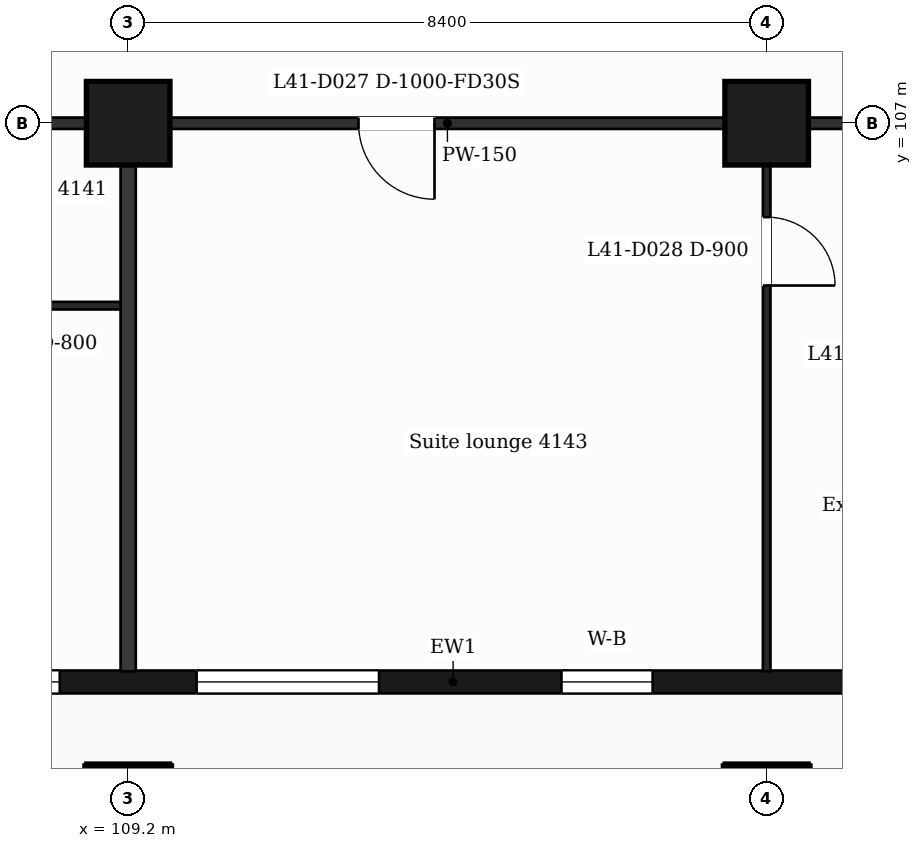
"""IFC4 building model, lengths in metres.
Left out: names, types, materials, properties, quantities, classifications, styles, units other than length and angle.
Written with IfcOpenShell. Run it as: python <this file> out.ifc"""

import sys

from ifc_helpers import new_model, si_unit, direction, frame, frame_2d, origin, origin_2d, place, context, subcontext, project, spatial, rectangle, extrude, element, fill, save


model = new_model("IFC4")
c1 = context("Model", 3, precision=1e-05, world=origin(), true_north=direction((0.0, 1.0)))
c2 = subcontext(c1, "Body", "Model", "MODEL_VIEW")
j1 = project(units=[si_unit("LENGTHUNIT", "METRE"), si_unit("PLANEANGLEUNIT", "RADIAN")], contexts=[c1])
p1 = place(None, origin())
s1 = spatial("IfcSite", under=j1, at=p1, CompositionType="ELEMENT")
p2 = place(p1, origin())
s2 = spatial("IfcBuilding", under=s1, at=p2, CompositionType="ELEMENT")
p3 = place(p2, frame((0.0, 0.0, 173.7)))
s3 = spatial("IfcBuildingStorey", under=s2, at=p3, CompositionType="ELEMENT", Elevation=173.7)
for number, where, z_axis, x_axis in (
    (1, (109.2, 98.0, 0.0), (0.0, 0.0, 1.0), (1.0, 0.0, 0.0)),
    (2, (117.6, 98.0, 0.0), (0.0, 0.0, 1.0), (1.0, 0.0, 0.0)),
    (3, (109.2, 107.0, 0.0), (0.0, 0.0, 1.0), (1.0, 0.0, 0.0)),
    (4, (117.6, 107.0, 0.0), (0.0, 0.0, 1.0), (1.0, 0.0, 0.0)),
):
    element("IfcColumn", number, at=place(p3, frame(where, z_axis=z_axis, x_axis=x_axis)), inside=s3, PredefinedType="COLUMN", context=c2, shape_type="SweptSolid", body=[
        extrude(rectangle(XDim=1.1, YDim=1.1, at=origin_2d()), origin(), (0.0, 0.0, 1.0), 3.7),
    ])
p4 = place(p3, frame((89.85, 99.65, 0.0), z_axis=(0.0, 0.0, 1.0), x_axis=(1.0, 0.0, 0.0)))
e5 = element("IfcWall", 5, at=p4, inside=s3, PredefinedType="SOLIDWALL", context=c2, shape_type="SweptSolid", body=[
    extrude(rectangle(XDim=47.25, YDim=0.3, at=frame_2d((23.625, 0.0))), origin(), (0.0, 0.0, 1.0), 3.38),
])
p5 = place(p4, frame((0.725, 0.0, 0.9)))
e6 = element("IfcOpeningElement", 6, at=p5, cuts=e5, PredefinedType="OPENING", context=c2, shape_type="SweptSolid", body=[
    extrude(rectangle(XDim=1.2, YDim=2.1, at=frame_2d((0.6, 1.05))), frame((0.0, 0.16, 0.0), z_axis=(0.0, -1.0, 0.0), x_axis=(1.0, 0.0, 0.0)), (0.0, 0.0, 1.0), 0.32),
])
p6 = place(p4, frame((3.45, 0.0, 0.9)))
e7 = element("IfcOpeningElement", 7, at=p6, cuts=e5, PredefinedType="OPENING", context=c2, shape_type="SweptSolid", body=[
    extrude(rectangle(XDim=2.4, YDim=2.1, at=frame_2d((1.2, 1.05))), frame((0.0, 0.16, 0.0), z_axis=(0.0, -1.0, 0.0), x_axis=(1.0, 0.0, 0.0)), (0.0, 0.0, 1.0), 0.32),
])
p7 = place(p4, frame((7.65, 0.0, 0.9)))
e8 = element("IfcOpeningElement", 8, at=p7, cuts=e5, PredefinedType="OPENING", context=c2, shape_type="SweptSolid", body=[
    extrude(rectangle(XDim=2.4, YDim=2.1, at=frame_2d((1.2, 1.05))), frame((0.0, 0.16, 0.0), z_axis=(0.0, -1.0, 0.0), x_axis=(1.0, 0.0, 0.0)), (0.0, 0.0, 1.0), 0.32),
])
p8 = place(p4, frame((11.85, 0.0, 0.9)))
e9 = element("IfcOpeningElement", 9, at=p8, cuts=e5, PredefinedType="OPENING", context=c2, shape_type="SweptSolid", body=[
    extrude(rectangle(XDim=2.4, YDim=2.1, at=frame_2d((1.2, 1.05))), frame((0.0, 0.16, 0.0), z_axis=(0.0, -1.0, 0.0), x_axis=(1.0, 0.0, 0.0)), (0.0, 0.0, 1.0), 0.32),
])
p9 = place(p4, frame((16.05, 0.0, 0.9)))
e10 = element("IfcOpeningElement", 10, at=p9, cuts=e5, PredefinedType="OPENING", context=c2, shape_type="SweptSolid", body=[
    extrude(rectangle(XDim=2.4, YDim=2.1, at=frame_2d((1.2, 1.05))), frame((0.0, 0.16, 0.0), z_axis=(0.0, -1.0, 0.0), x_axis=(1.0, 0.0, 0.0)), (0.0, 0.0, 1.0), 0.32),
])
p10 = place(p4, frame((20.25, 0.0, 0.9)))
e11 = element("IfcOpeningElement", 11, at=p10, cuts=e5, PredefinedType="OPENING", context=c2, shape_type="SweptSolid", body=[
    extrude(rectangle(XDim=2.4, YDim=2.1, at=frame_2d((1.2, 1.05))), frame((0.0, 0.16, 0.0), z_axis=(0.0, -1.0, 0.0), x_axis=(1.0, 0.0, 0.0)), (0.0, 0.0, 1.0), 0.32),
])
p11 = place(p4, frame((25.05, 0.0, 0.9)))
e12 = element("IfcOpeningElement", 12, at=p11, cuts=e5, PredefinedType="OPENING", context=c2, shape_type="SweptSolid", body=[
    extrude(rectangle(XDim=1.2, YDim=2.1, at=frame_2d((0.6, 1.05))), frame((0.0, 0.16, 0.0), z_axis=(0.0, -1.0, 0.0), x_axis=(1.0, 0.0, 0.0)), (0.0, 0.0, 1.0), 0.32),
])
p12 = place(p4, frame((29.25, 0.0, 0.9)))
e13 = element("IfcOpeningElement", 13, at=p12, cuts=e5, PredefinedType="OPENING", context=c2, shape_type="SweptSolid", body=[
    extrude(rectangle(XDim=1.2, YDim=2.1, at=frame_2d((0.6, 1.05))), frame((0.0, 0.16, 0.0), z_axis=(0.0, -1.0, 0.0), x_axis=(1.0, 0.0, 0.0)), (0.0, 0.0, 1.0), 0.32),
])
p13 = place(p4, frame((32.55, 0.0, 0.0)))
e14 = element("IfcOpeningElement", 14, at=p13, cuts=e5, PredefinedType="OPENING", context=c2, shape_type="SweptSolid", body=[
    extrude(rectangle(XDim=1.2, YDim=2.4, at=frame_2d((0.6, 1.2))), frame((0.0, 0.16, 0.0), z_axis=(0.0, -1.0, 0.0), x_axis=(1.0, 0.0, 0.0)), (0.0, 0.0, 1.0), 0.32),
])
p14 = place(p4, frame((34.35, 0.0, 0.9)))
e15 = element("IfcOpeningElement", 15, at=p14, cuts=e5, PredefinedType="OPENING", context=c2, shape_type="SweptSolid", body=[
    extrude(rectangle(XDim=1.2, YDim=2.1, at=frame_2d((0.6, 1.05))), frame((0.0, 0.16, 0.0), z_axis=(0.0, -1.0, 0.0), x_axis=(1.0, 0.0, 0.0)), (0.0, 0.0, 1.0), 0.32),
])
p15 = place(p4, frame((37.05, 0.0, 0.9)))
e16 = element("IfcOpeningElement", 16, at=p15, cuts=e5, PredefinedType="OPENING", context=c2, shape_type="SweptSolid", body=[
    extrude(rectangle(XDim=2.4, YDim=2.1, at=frame_2d((1.2, 1.05))), frame((0.0, 0.16, 0.0), z_axis=(0.0, -1.0, 0.0), x_axis=(1.0, 0.0, 0.0)), (0.0, 0.0, 1.0), 0.32),
])
p16 = place(p4, frame((40.95, 0.0, 0.0)))
e17 = element("IfcOpeningElement", 17, at=p16, cuts=e5, PredefinedType="OPENING", context=c2, shape_type="SweptSolid", body=[
    extrude(rectangle(XDim=1.2, YDim=2.4, at=frame_2d((0.6, 1.2))), frame((0.0, 0.16, 0.0), z_axis=(0.0, -1.0, 0.0), x_axis=(1.0, 0.0, 0.0)), (0.0, 0.0, 1.0), 0.32),
])
p17 = place(p4, frame((42.75, 0.0, 0.9)))
e18 = element("IfcOpeningElement", 18, at=p17, cuts=e5, PredefinedType="OPENING", context=c2, shape_type="SweptSolid", body=[
    extrude(rectangle(XDim=1.2, YDim=2.1, at=frame_2d((0.6, 1.05))), frame((0.0, 0.16, 0.0), z_axis=(0.0, -1.0, 0.0), x_axis=(1.0, 0.0, 0.0)), (0.0, 0.0, 1.0), 0.32),
])
p18 = place(p4, frame((45.25, 0.0, 0.9)))
e19 = element("IfcOpeningElement", 19, at=p18, cuts=e5, PredefinedType="OPENING", context=c2, shape_type="SweptSolid", body=[
    extrude(rectangle(XDim=1.2, YDim=2.1, at=frame_2d((0.6, 1.05))), frame((0.0, 0.16, 0.0), z_axis=(0.0, -1.0, 0.0), x_axis=(1.0, 0.0, 0.0)), (0.0, 0.0, 1.0), 0.32),
])
p19 = place(p3, frame((106.45, 104.6, 0.0), z_axis=(0.0, 0.0, 1.0), x_axis=(1.0, 0.0, 0.0)))
e20 = element("IfcWall", 20, at=p19, inside=s3, PredefinedType="PARTITIONING", context=c2, shape_type="SweptSolid", body=[
    extrude(rectangle(XDim=2.75, YDim=0.1, at=frame_2d((1.375, 0.0))), origin(), (0.0, 0.0, 1.0), 3.38),
])
p20 = place(p19, frame((0.88, 0.0, 0.0)))
e21 = element("IfcOpeningElement", 21, at=p20, cuts=e20, PredefinedType="OPENING", context=c2, shape_type="SweptSolid", body=[
    extrude(rectangle(XDim=0.8, YDim=2.1, at=frame_2d((0.4, 1.05))), frame((0.0, 0.06, 0.0), z_axis=(0.0, -1.0, 0.0), x_axis=(1.0, 0.0, 0.0)), (0.0, 0.0, 1.0), 0.12),
])
p21 = place(p3, frame((87.018, 107.0, 0.0), z_axis=(0.0, 0.0, 1.0), x_axis=(1.0, 0.0, 0.0)))
e22 = element("IfcWall", 22, at=p21, inside=s3, PredefinedType="PARTITIONING", context=c2, shape_type="SweptSolid", body=[
    extrude(rectangle(XDim=52.765, YDim=0.15, at=frame_2d((26.382, 0.0))), origin(), (0.0, 0.0, 1.0), 3.38),
])
p22 = place(p21, frame((1.276, 0.0, 0.0)))
e23 = element("IfcOpeningElement", 23, at=p22, cuts=e22, PredefinedType="OPENING", context=c2, shape_type="SweptSolid", body=[
    extrude(rectangle(XDim=0.95, YDim=2.1, at=frame_2d((0.475, 1.05))), frame((0.0, 0.085, 0.0), z_axis=(0.0, -1.0, 0.0), x_axis=(1.0, 0.0, 0.0)), (0.0, 0.0, 1.0), 0.17),
])
p23 = place(p21, frame((8.357, 0.0, 0.0)))
e24 = element("IfcOpeningElement", 24, at=p23, cuts=e22, PredefinedType="OPENING", context=c2, shape_type="SweptSolid", body=[
    extrude(rectangle(XDim=0.95, YDim=2.1, at=frame_2d((0.475, 1.05))), frame((0.0, 0.085, 0.0), z_axis=(0.0, -1.0, 0.0), x_axis=(1.0, 0.0, 0.0)), (0.0, 0.0, 1.0), 0.17),
])
p24 = place(p21, frame((9.832, 0.0, 0.0)))
e25 = element("IfcOpeningElement", 25, at=p24, cuts=e22, PredefinedType="OPENING", context=c2, shape_type="SweptSolid", body=[
    extrude(rectangle(XDim=1.0, YDim=2.1, at=frame_2d((0.5, 1.05))), frame((0.0, 0.085, 0.0), z_axis=(0.0, -1.0, 0.0), x_axis=(1.0, 0.0, 0.0)), (0.0, 0.0, 1.0), 0.17),
])
p25 = place(p21, frame((14.547, 0.0, 0.0)))
e26 = element("IfcOpeningElement", 26, at=p25, cuts=e22, PredefinedType="OPENING", context=c2, shape_type="SweptSolid", body=[
    extrude(rectangle(XDim=0.95, YDim=2.1, at=frame_2d((0.475, 1.05))), frame((0.0, 0.085, 0.0), z_axis=(0.0, -1.0, 0.0), x_axis=(1.0, 0.0, 0.0)), (0.0, 0.0, 1.0), 0.17),
])
p26 = place(p21, frame((18.257, 0.0, 0.0)))
e27 = element("IfcOpeningElement", 27, at=p26, cuts=e22, PredefinedType="OPENING", context=c2, shape_type="SweptSolid", body=[
    extrude(rectangle(XDim=0.95, YDim=2.1, at=frame_2d((0.475, 1.05))), frame((0.0, 0.085, 0.0), z_axis=(0.0, -1.0, 0.0), x_axis=(1.0, 0.0, 0.0)), (0.0, 0.0, 1.0), 0.17),
])
p27 = place(p21, frame((25.212, 0.0, 0.0)))
e28 = element("IfcOpeningElement", 28, at=p27, cuts=e22, PredefinedType="OPENING", context=c2, shape_type="SweptSolid", body=[
    extrude(rectangle(XDim=1.0, YDim=2.1, at=frame_2d((0.5, 1.05))), frame((0.0, 0.085, 0.0), z_axis=(0.0, -1.0, 0.0), x_axis=(1.0, 0.0, 0.0)), (0.0, 0.0, 1.0), 0.17),
])
p28 = place(p21, frame((37.267, 0.0, 0.0)))
e29 = element("IfcOpeningElement", 29, at=p28, cuts=e22, PredefinedType="OPENING", context=c2, shape_type="SweptSolid", body=[
    extrude(rectangle(XDim=0.95, YDim=2.1, at=frame_2d((0.475, 1.05))), frame((0.0, 0.085, 0.0), z_axis=(0.0, -1.0, 0.0), x_axis=(1.0, 0.0, 0.0)), (0.0, 0.0, 1.0), 0.17),
])
p29 = place(p21, frame((41.957, 0.0, 0.0)))
e30 = element("IfcOpeningElement", 30, at=p29, cuts=e22, PredefinedType="OPENING", context=c2, shape_type="SweptSolid", body=[
    extrude(rectangle(XDim=0.95, YDim=2.1, at=frame_2d((0.475, 1.05))), frame((0.0, 0.085, 0.0), z_axis=(0.0, -1.0, 0.0), x_axis=(1.0, 0.0, 0.0)), (0.0, 0.0, 1.0), 0.17),
])
p30 = place(p21, frame((45.632, 0.0, 0.0)))
e31 = element("IfcOpeningElement", 31, at=p30, cuts=e22, PredefinedType="OPENING", context=c2, shape_type="SweptSolid", body=[
    extrude(rectangle(XDim=0.95, YDim=2.1, at=frame_2d((0.475, 1.05))), frame((0.0, 0.085, 0.0), z_axis=(0.0, -1.0, 0.0), x_axis=(1.0, 0.0, 0.0)), (0.0, 0.0, 1.0), 0.17),
])
p31 = place(p21, frame((48.767, 0.0, 0.0)))
e32 = element("IfcOpeningElement", 32, at=p31, cuts=e22, PredefinedType="OPENING", context=c2, shape_type="SweptSolid", body=[
    extrude(rectangle(XDim=0.95, YDim=2.1, at=frame_2d((0.475, 1.05))), frame((0.0, 0.085, 0.0), z_axis=(0.0, -1.0, 0.0), x_axis=(1.0, 0.0, 0.0)), (0.0, 0.0, 1.0), 0.17),
])
p32 = place(p3, frame((109.2, 99.79, 0.0), z_axis=(0.0, 0.0, 1.0), x_axis=(0.0, 1.0, 0.0)))
e33 = element("IfcWall", 33, at=p32, inside=s3, PredefinedType="PARTITIONING", context=c2, shape_type="SweptSolid", body=[
    extrude(rectangle(XDim=7.135, YDim=0.2, at=frame_2d((3.567, 0.0))), origin(), (0.0, 0.0, 1.0), 3.38),
])
p33 = place(p3, frame((117.6, 99.79, 0.0), z_axis=(0.0, 0.0, 1.0), x_axis=(0.0, 1.0, 0.0)))
e34 = element("IfcWall", 34, at=p33, inside=s3, PredefinedType="PARTITIONING", context=c2, shape_type="SweptSolid", body=[
    extrude(rectangle(XDim=7.135, YDim=0.1, at=frame_2d((3.567, 0.0))), origin(), (0.0, 0.0, 1.0), 3.38),
])
p34 = place(p33, frame((5.075, 0.0, 0.0)))
e35 = element("IfcOpeningElement", 35, at=p34, cuts=e34, PredefinedType="OPENING", context=c2, shape_type="SweptSolid", body=[
    extrude(rectangle(XDim=0.9, YDim=2.1, at=frame_2d((0.45, 1.05))), frame((0.0, 0.06, 0.0), z_axis=(0.0, -1.0, 0.0), x_axis=(1.0, 0.0, 0.0)), (0.0, 0.0, 1.0), 0.12),
])
p35 = place(p9, origin())
e36 = element("IfcWindow", 36, at=p35, inside=s3, PartitioningType="SINGLE_PANEL", PredefinedType="WINDOW", context=c2, shape_type="SweptSolid", body=[
    extrude(rectangle(XDim=2.4, YDim=2.1, at=frame_2d((1.2, 1.05))), frame((0.0, 0.03, 0.0), z_axis=(0.0, -1.0, 0.0), x_axis=(1.0, 0.0, 0.0)), (0.0, 0.0, 1.0), 0.06),
])
fill(e10, e36)
p36 = place(p10, origin())
e37 = element("IfcWindow", 37, at=p36, inside=s3, PartitioningType="SINGLE_PANEL", PredefinedType="WINDOW", context=c2, shape_type="SweptSolid", body=[
    extrude(rectangle(XDim=2.4, YDim=2.1, at=frame_2d((1.2, 1.05))), frame((0.0, 0.03, 0.0), z_axis=(0.0, -1.0, 0.0), x_axis=(1.0, 0.0, 0.0)), (0.0, 0.0, 1.0), 0.06),
])
fill(e11, e37)
p37 = place(p11, origin())
e38 = element("IfcWindow", 38, at=p37, inside=s3, PartitioningType="SINGLE_PANEL", PredefinedType="WINDOW", context=c2, shape_type="SweptSolid", body=[
    extrude(rectangle(XDim=1.2, YDim=2.1, at=frame_2d((0.6, 1.05))), frame((0.0, 0.03, 0.0), z_axis=(0.0, -1.0, 0.0), x_axis=(1.0, 0.0, 0.0)), (0.0, 0.0, 1.0), 0.06),
])
fill(e12, e38)
p38 = place(p27, origin())
e39 = element("IfcDoor", 39, at=p38, inside=s3, OperationType="SINGLE_SWING_RIGHT", PredefinedType="DOOR", context=c2, shape_type="SweptSolid", body=[
    extrude(rectangle(XDim=1.0, YDim=2.1, at=frame_2d((0.5, 1.05))), frame((0.0, 0.025, 0.0), z_axis=(0.0, -1.0, 0.0), x_axis=(1.0, 0.0, 0.0)), (0.0, 0.0, 1.0), 0.05),
])
fill(e28, e39)
p39 = place(p34, origin())
e40 = element("IfcDoor", 40, at=p39, inside=s3, OperationType="SINGLE_SWING_LEFT", PredefinedType="DOOR", context=c2, shape_type="SweptSolid", body=[
    extrude(rectangle(XDim=0.9, YDim=2.1, at=frame_2d((0.45, 1.05))), frame((0.0, 0.025, 0.0), z_axis=(0.0, -1.0, 0.0), x_axis=(1.0, 0.0, 0.0)), (0.0, 0.0, 1.0), 0.05),
])
fill(e35, e40)
save(model, sys.argv[1])
